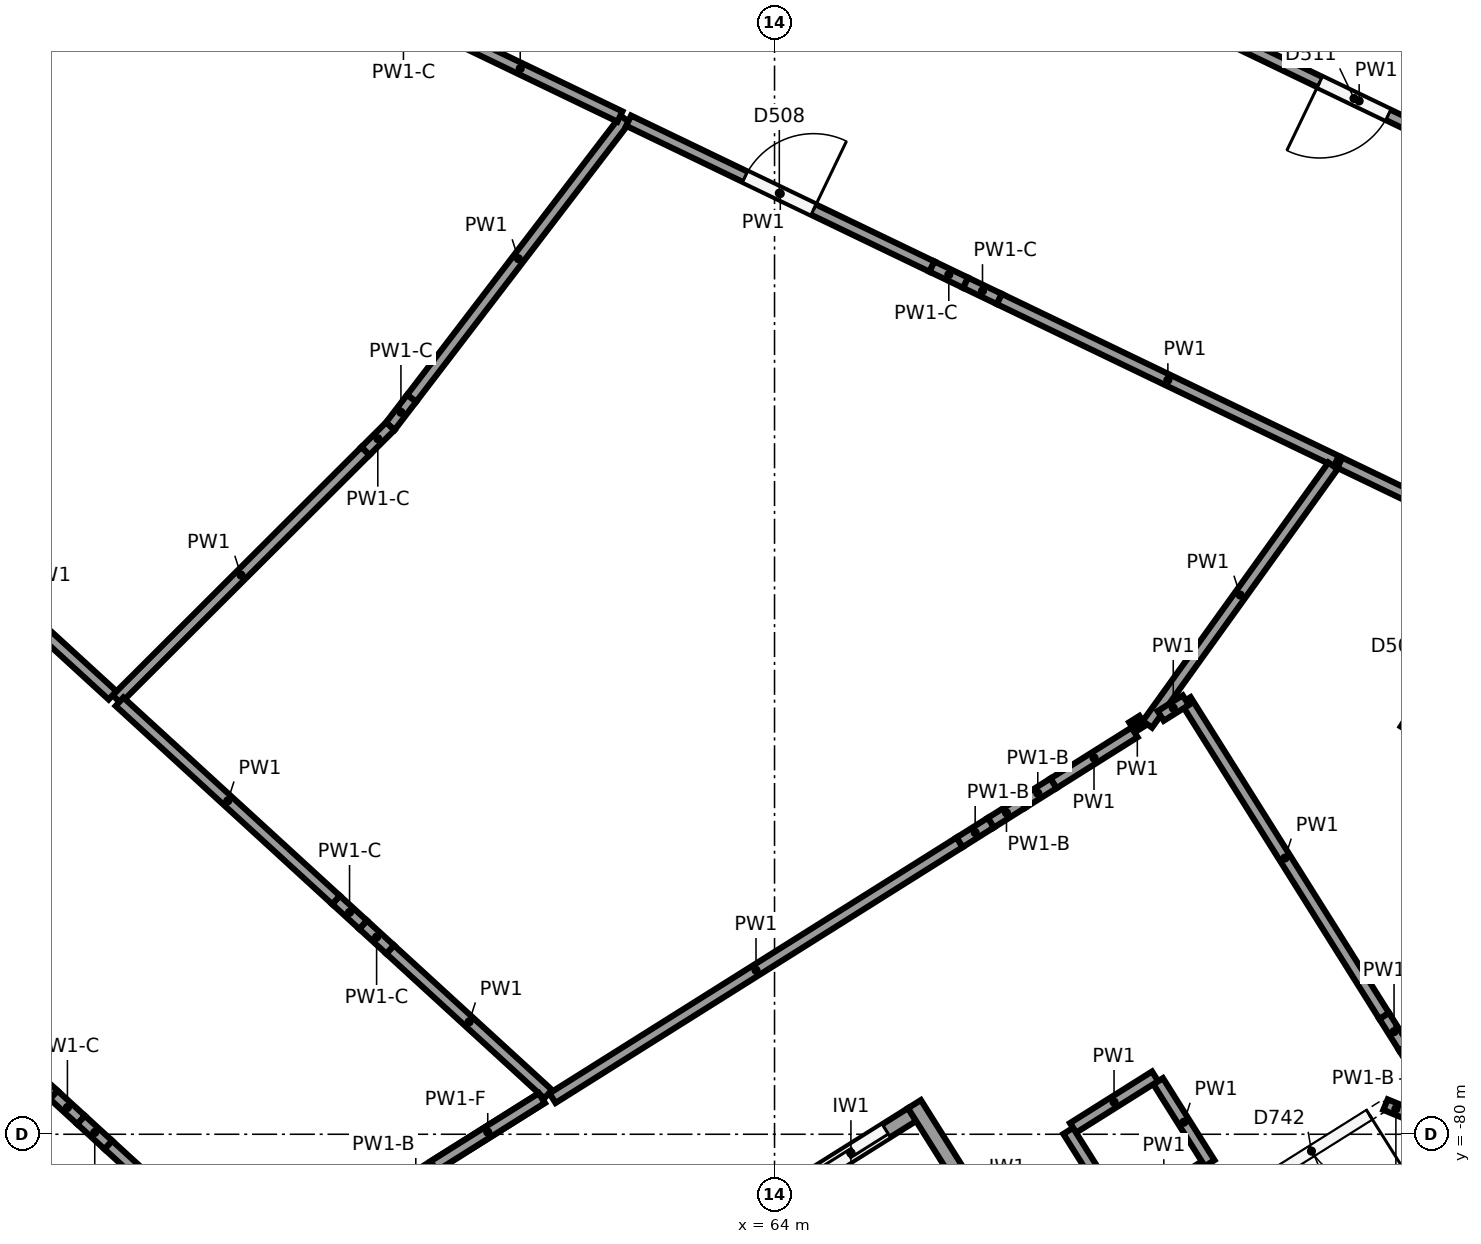
"""IFC4 building model, lengths in metres.
Left out: names, types, materials, properties, quantities, classifications, styles, units other than length and angle.
Written with IfcOpenShell. Run it as: python <this file> out.ifc"""

import sys

from ifc_helpers import new_model, si_unit, direction, frame, frame_2d, origin, origin_2d, place, context, subcontext, project, spatial, rectangle, circle, extrude, element, fill, save


model = new_model("IFC4")
c1 = context("Model", 3, precision=1e-05, world=origin(), true_north=direction((0.0, 1.0)))
c2 = subcontext(c1, "Body", "Model", "MODEL_VIEW")
j1 = project(units=[si_unit("LENGTHUNIT", "METRE"), si_unit("PLANEANGLEUNIT", "RADIAN")], contexts=[c1])
p1 = place(None, origin())
s1 = spatial("IfcSite", under=j1, at=p1, CompositionType="ELEMENT")
p2 = place(p1, origin())
s2 = spatial("IfcBuilding", under=s1, at=p2, CompositionType="ELEMENT")
p3 = place(p2, frame((0.0, 0.0, -4.0)))
s3 = spatial("IfcBuildingStorey", under=s2, at=p3, CompositionType="ELEMENT", Elevation=-4.0)
for number, where, z_axis, x_axis in (
    (1, (56.915, -78.696, -0.4), (0.0, 0.0, 1.0), (1.0, 0.0, 0.0)),
    (2, (54.82, -67.902, -0.4), (0.0, 0.0, 1.0), (1.0, 0.0, 0.0)),
):
    element("IfcColumn", number, at=place(p3, frame(where, z_axis=z_axis, x_axis=x_axis)), inside=s3, PredefinedType="COLUMN", context=c2, shape_type="SweptSolid", body=[
        extrude(circle(Radius=0.45, at=origin_2d()), origin(), (0.0, 0.0, 1.0), 4.4),
    ])
p4 = place(p3, frame((55.94, -68.658, -0.4), z_axis=(0.0, 0.0, 1.0), x_axis=(1.0, 0.0, 0.0)))
e3 = element("IfcColumn", 3, at=p4, inside=s3, PredefinedType="COLUMN", context=c2, shape_type="SweptSolid", body=[
    extrude(circle(Radius=0.4, at=origin_2d()), origin(), (0.0, 0.0, 1.0), 4.4),
])
p5 = place(p3, frame((63.068, -73.47, -0.4), z_axis=(0.0, 0.0, 1.0), x_axis=(1.0, 0.0, 0.0)))
e4 = element("IfcColumn", 4, at=p5, inside=s3, PredefinedType="COLUMN", context=c2, shape_type="SweptSolid", body=[
    extrude(circle(Radius=0.45, at=origin_2d()), origin(), (0.0, 0.0, 1.0), 4.4),
])
p6 = place(p3, frame((72.312, -79.091, -1.2), z_axis=(0.0, 0.0, 1.0), x_axis=(1.0, 0.0, 0.0)))
e5 = element("IfcColumn", 5, at=p6, inside=s3, PredefinedType="COLUMN", context=c2, shape_type="SweptSolid", body=[
    extrude(circle(Radius=0.5, at=origin_2d()), origin(), (0.0, 0.0, 1.0), 5.2),
])
p7 = place(p3, frame((67.972, -67.058, -0.4), z_axis=(0.0, 0.0, 1.0), x_axis=(1.0, 0.0, 0.0)))
e6 = element("IfcColumn", 6, at=p7, inside=s3, PredefinedType="COLUMN", context=c2, shape_type="SweptSolid", body=[
    extrude(circle(Radius=0.45, at=origin_2d()), origin(), (0.0, 0.0, 1.0), 4.4),
])
p8 = place(p3, frame((67.437, -82.143, -1.2), z_axis=(0.0, 0.0, 1.0), x_axis=(-0.532038212918, 0.84672034344, 0.0)))
e7 = element("IfcWall", 7, at=p8, inside=s3, PredefinedType="SHEAR", context=c2, shape_type="SweptSolid", body=[
    extrude(rectangle(XDim=3.0, YDim=0.2, at=frame_2d((1.5, 0.0))), origin(), (0.0, 0.0, 1.0), 4.8),
])
p9 = place(p3, frame((64.201, -80.752, -1.2), z_axis=(0.0, 0.0, 1.0), x_axis=(0.846768850524, 0.531961007765, 0.0)))
e8 = element("IfcWall", 8, at=p9, inside=s3, PredefinedType="SHEAR", context=c2, shape_type="SweptSolid", body=[
    extrude(rectangle(XDim=1.9, YDim=0.2, at=frame_2d((0.95, 0.0))), origin(), (0.0, 0.0, 1.0), 4.8),
])
p10 = place(p9, frame((0.4, 0.0, 1.2)))
e9 = element("IfcOpeningElement", 9, at=p10, cuts=e8, PredefinedType="OPENING", context=c2, shape_type="SweptSolid", body=[
    extrude(rectangle(XDim=1.1, YDim=2.1, at=frame_2d((0.55, 1.05))), frame((0.0, 0.11, 0.0), z_axis=(0.0, -1.0, 0.0), x_axis=(1.0, 0.0, 0.0)), (0.0, 0.0, 1.0), 0.22),
])
p11 = place(p3, frame((50.92, -76.19, 0.0), z_axis=(0.0, 0.0, 1.0), x_axis=(0.737613311295, -0.675223372671, 0.0)))
e10 = element("IfcWall", 10, at=p11, inside=s3, PredefinedType="PARTITIONING", context=c2, shape_type="SweptSolid", body=[
    extrude(rectangle(XDim=4.876, YDim=0.15, at=frame_2d((2.438, 0.0))), origin(), (0.0, 0.0, 1.0), 3.6),
])
for number, where, z_axis, x_axis in (
    (11, (54.517, -79.483, 0.0), (0.0, 0.0, 1.0), (0.737, -0.675, 0.0)),
    (12, (54.876, -79.812, 0.0), (0.0, 0.0, 1.0), (0.738, -0.675, 0.0)),
):
    element("IfcWall", number, at=place(p3, frame(where, z_axis=z_axis, x_axis=x_axis)), inside=s3, PredefinedType="PARTITIONING", context=c2, shape_type="SweptSolid", body=[
        extrude(rectangle(XDim=0.488, YDim=0.15, at=frame_2d((0.244, 0.0))), origin(), (0.0, 0.0, 1.0), 2.7),
    ])
p12 = place(p3, frame((55.236, -80.141, 0.0), z_axis=(0.0, 0.0, 1.0), x_axis=(0.737605282211, -0.675232143529, 0.0)))
e13 = element("IfcWall", 13, at=p12, inside=s3, PredefinedType="PARTITIONING", context=c2, shape_type="SweptSolid", body=[
    extrude(rectangle(XDim=3.413, YDim=0.15, at=frame_2d((1.707, 0.0))), origin(), (0.0, 0.0, 1.0), 3.6),
])
p13 = place(p3, frame((62.035, -66.644, 0.0), z_axis=(0.0, 0.0, 1.0), x_axis=(-0.607522587772, -0.7943024017, 0.0)))
e14 = element("IfcWall", 14, at=p13, inside=s3, PredefinedType="PARTITIONING", context=c2, shape_type="SweptSolid", body=[
    extrude(rectangle(XDim=4.626, YDim=0.15, at=frame_2d((2.313, 0.0))), origin(), (0.0, 0.0, 1.0), 3.6),
])
p14 = place(p3, frame((59.225, -70.318, 0.0), z_axis=(0.0, 0.0, 1.0), x_axis=(-0.607234679448, -0.794522525846, 0.0)))
e15 = element("IfcWall", 15, at=p14, inside=s3, PredefinedType="PARTITIONING", context=c2, shape_type="SweptSolid", body=[
    extrude(rectangle(XDim=0.463, YDim=0.15, at=frame_2d((0.231, 0.0))), origin(), (0.0, 0.0, 1.0), 2.7),
])
p15 = place(p3, frame((58.944, -70.686, 0.0), z_axis=(0.0, 0.0, 1.0), x_axis=(-0.707898761155, -0.706313913182, 0.0)))
e16 = element("IfcWall", 16, at=p15, inside=s3, PredefinedType="PARTITIONING", context=c2, shape_type="SweptSolid", body=[
    extrude(rectangle(XDim=0.462, YDim=0.15, at=frame_2d((0.231, 0.0))), origin(), (0.0, 0.0, 1.0), 2.7),
])
p16 = place(p3, frame((58.617, -71.012, 0.0), z_axis=(0.0, 0.0, 1.0), x_axis=(-0.707977942718, -0.706234545052, 0.0)))
e17 = element("IfcWall", 17, at=p16, inside=s3, PredefinedType="PARTITIONING", context=c2, shape_type="SweptSolid", body=[
    extrude(rectangle(XDim=4.621, YDim=0.15, at=frame_2d((2.311, 0.0))), origin(), (0.0, 0.0, 1.0), 3.6),
])
p17 = place(p3, frame((55.29, -74.225, 0.0), z_axis=(0.0, 0.0, 1.0), x_axis=(-0.737592778543, 0.675245801942, 0.0)))
e18 = element("IfcWall", 18, at=p17, inside=s3, PredefinedType="PARTITIONING", context=c2, shape_type="SweptSolid", body=[
    extrude(rectangle(XDim=3.395, YDim=0.15, at=frame_2d((1.698, 0.0))), origin(), (0.0, 0.0, 1.0), 3.6),
])
p18 = place(p17, frame((1.2, 0.0, 0.0)))
e19 = element("IfcOpeningElement", 19, at=p18, cuts=e18, PredefinedType="OPENING", context=c2, shape_type="SweptSolid", body=[
    extrude(rectangle(XDim=1.0, YDim=2.1, at=frame_2d((0.5, 1.05))), frame((0.0, 0.085, 0.0), z_axis=(0.0, -1.0, 0.0), x_axis=(1.0, 0.0, 0.0)), (0.0, 0.0, 1.0), 0.17),
])
p19 = place(p3, frame((59.342, -65.348, 0.0), z_axis=(0.0, 0.0, 1.0), x_axis=(0.901164254203, -0.433477781376, 0.0)))
e20 = element("IfcWall", 20, at=p19, inside=s3, PredefinedType="PARTITIONING", context=c2, shape_type="SweptSolid", body=[
    extrude(rectangle(XDim=2.912, YDim=0.15, at=frame_2d((1.456, 0.0))), origin(), (0.0, 0.0, 1.0), 3.6),
])
p20 = place(p3, frame((62.08, -66.665, 0.0), z_axis=(0.0, 0.0, 1.0), x_axis=(0.901190728749, -0.433422738694, 0.0)))
e21 = element("IfcWall", 21, at=p20, inside=s3, PredefinedType="PARTITIONING", context=c2, shape_type="SweptSolid", body=[
    extrude(rectangle(XDim=4.428, YDim=0.15, at=frame_2d((2.214, 0.0))), origin(), (0.0, 0.0, 1.0), 3.6),
])
p21 = place(p20, frame((1.7, 0.0, 0.0)))
e22 = element("IfcOpeningElement", 22, at=p21, cuts=e21, PredefinedType="OPENING", context=c2, shape_type="SweptSolid", body=[
    extrude(rectangle(XDim=1.0, YDim=2.1, at=frame_2d((0.5, 1.05))), frame((0.0, 0.085, 0.0), z_axis=(0.0, -1.0, 0.0), x_axis=(1.0, 0.0, 0.0)), (0.0, 0.0, 1.0), 0.17),
])
p22 = place(p3, frame((66.071, -68.585, 0.0), z_axis=(0.0, 0.0, 1.0), x_axis=(0.90126733215, -0.433263425643, 0.0)))
e23 = element("IfcWall", 23, at=p22, inside=s3, PredefinedType="PARTITIONING", context=c2, shape_type="SweptSolid", body=[
    extrude(rectangle(XDim=0.492, YDim=0.15, at=frame_2d((0.246, 0.0))), origin(), (0.0, 0.0, 1.0), 2.7),
])
p23 = place(p3, frame((66.514, -68.798, 0.0), z_axis=(0.0, 0.0, 1.0), x_axis=(0.901166741742, -0.433472609952, 0.0)))
e24 = element("IfcWall", 24, at=p23, inside=s3, PredefinedType="PARTITIONING", context=c2, shape_type="SweptSolid", body=[
    extrude(rectangle(XDim=0.492, YDim=0.15, at=frame_2d((0.246, 0.0))), origin(), (0.0, 0.0, 1.0), 2.7),
])
p24 = place(p3, frame((66.958, -69.011, 0.0), z_axis=(0.0, 0.0, 1.0), x_axis=(0.901198388505, -0.433406811848, 0.0)))
e25 = element("IfcWall", 25, at=p24, inside=s3, PredefinedType="PARTITIONING", context=c2, shape_type="SweptSolid", body=[
    extrude(rectangle(XDim=4.92, YDim=0.15, at=frame_2d((2.46, 0.0))), origin(), (0.0, 0.0, 1.0), 3.6),
])
p25 = place(p3, frame((71.348, -71.206, 0.0), z_axis=(0.0, 0.0, 1.0), x_axis=(-0.583304436704, -0.812253614409, 0.0)))
e26 = element("IfcWall", 26, at=p25, inside=s3, PredefinedType="PARTITIONING", context=c2, shape_type="SweptSolid", body=[
    extrude(rectangle(XDim=4.188, YDim=0.15, at=frame_2d((2.094, 0.0))), origin(), (0.0, 0.0, 1.0), 3.6),
])
p26 = place(p3, frame((68.737, -74.713, 0.0), z_axis=(0.0, 0.0, 1.0), x_axis=(-0.846733767691, -0.53201684809, 0.0)))
e27 = element("IfcWall", 27, at=p26, inside=s3, PredefinedType="PARTITIONING", context=c2, shape_type="SweptSolid", body=[
    extrude(rectangle(XDim=1.26, YDim=0.15, at=frame_2d((0.63, 0.0))), origin(), (0.0, 0.0, 1.0), 3.6),
])
for number, where, z_axis, x_axis in (
    (28, (67.67, -75.383, 0.0), (0.0, 0.0, 1.0), (-0.847, -0.532, 0.0)),
    (29, (67.258, -75.642, 0.0), (0.0, 0.0, 1.0), (-0.847, -0.532, 0.0)),
):
    element("IfcWall", number, at=place(p3, frame(where, z_axis=z_axis, x_axis=x_axis)), inside=s3, PredefinedType="PARTITIONING", context=c2, shape_type="SweptSolid", body=[
        extrude(rectangle(XDim=0.487, YDim=0.15, at=frame_2d((0.243, 0.0))), origin(), (0.0, 0.0, 1.0), 2.5),
    ])
p27 = place(p3, frame((66.846, -75.901, 0.0), z_axis=(0.0, 0.0, 1.0), x_axis=(-0.846726992897, -0.532027630392, 0.0)))
e30 = element("IfcWall", 30, at=p27, inside=s3, PredefinedType="PARTITIONING", context=c2, shape_type="SweptSolid", body=[
    extrude(rectangle(XDim=0.486, YDim=0.15, at=frame_2d((0.243, 0.0))), origin(), (0.0, 0.0, 1.0), 2.5),
])
p28 = place(p3, frame((66.434, -76.16, 0.0), z_axis=(0.0, 0.0, 1.0), x_axis=(-0.846724993081, -0.532030813105, 0.0)))
e31 = element("IfcWall", 31, at=p28, inside=s3, PredefinedType="PARTITIONING", context=c2, shape_type="SweptSolid", body=[
    extrude(rectangle(XDim=6.324, YDim=0.15, at=frame_2d((3.162, 0.0))), origin(), (0.0, 0.0, 1.0), 3.6),
])
p29 = place(p3, frame((61.021, -79.472, 0.0), z_axis=(0.0, 0.0, 1.0), x_axis=(-0.737642932996, 0.67519101253, 0.0)))
e32 = element("IfcWall", 32, at=p29, inside=s3, PredefinedType="PARTITIONING", context=c2, shape_type="SweptSolid", body=[
    extrude(rectangle(XDim=2.819, YDim=0.15, at=frame_2d((1.409, 0.0))), origin(), (0.0, 0.0, 1.0), 3.6),
])
p30 = place(p3, frame((58.942, -77.569, 0.0), z_axis=(0.0, 0.0, 1.0), x_axis=(-0.737531982112, 0.675312205844, 0.0)))
e33 = element("IfcWall", 33, at=p30, inside=s3, PredefinedType="PARTITIONING", context=c2, shape_type="SweptSolid", body=[
    extrude(rectangle(XDim=0.483, YDim=0.15, at=frame_2d((0.241, 0.0))), origin(), (0.0, 0.0, 1.0), 2.7),
])
p31 = place(p3, frame((58.586, -77.243, 0.0), z_axis=(0.0, 0.0, 1.0), x_axis=(-0.737762545062, 0.675060313679, 0.0)))
e34 = element("IfcWall", 34, at=p31, inside=s3, PredefinedType="PARTITIONING", context=c2, shape_type="SweptSolid", body=[
    extrude(rectangle(XDim=0.483, YDim=0.15, at=frame_2d((0.241, 0.0))), origin(), (0.0, 0.0, 1.0), 2.7),
])
p32 = place(p3, frame((58.23, -76.917, 0.0), z_axis=(0.0, 0.0, 1.0), x_axis=(-0.737586985775, 0.675252129516, 0.0)))
e35 = element("IfcWall", 35, at=p32, inside=s3, PredefinedType="PARTITIONING", context=c2, shape_type="SweptSolid", body=[
    extrude(rectangle(XDim=3.862, YDim=0.15, at=frame_2d((1.931, 0.0))), origin(), (0.0, 0.0, 1.0), 3.6),
])
p33 = place(p3, frame((72.803, -79.688, 0.0), z_axis=(0.0, 0.0, 1.0), x_axis=(-0.532100185812, 0.8466813995, 0.0)))
e36 = element("IfcWall", 36, at=p33, inside=s3, PredefinedType="PARTITIONING", context=c2, shape_type="SweptSolid", body=[
    extrude(rectangle(XDim=0.981, YDim=0.15, at=frame_2d((0.49, 0.0))), origin(), (0.0, 0.0, 1.0), 2.5),
])
p34 = place(p3, frame((72.281, -78.858, 0.0), z_axis=(0.0, 0.0, 1.0), x_axis=(-0.532100185812, 0.8466813995, 0.0)))
e37 = element("IfcWall", 37, at=p34, inside=s3, PredefinedType="PARTITIONING", context=c2, shape_type="SweptSolid", body=[
    extrude(rectangle(XDim=0.49, YDim=0.15, at=frame_2d((0.245, 0.0))), origin(), (0.0, 0.0, 1.0), 2.5),
])
p35 = place(p3, frame((72.021, -78.442, 0.0), z_axis=(0.0, 0.0, 1.0), x_axis=(-0.532042078101, 0.846717914733, 0.0)))
e38 = element("IfcWall", 38, at=p35, inside=s3, PredefinedType="PARTITIONING", context=c2, shape_type="SweptSolid", body=[
    extrude(rectangle(XDim=4.905, YDim=0.15, at=frame_2d((2.453, 0.0))), origin(), (0.0, 0.0, 1.0), 3.6),
])
p36 = place(p3, frame((69.411, -74.289, 0.0), z_axis=(0.0, 0.0, 1.0), x_axis=(-0.84669301854, -0.532081697069, 0.0)))
e39 = element("IfcWall", 39, at=p36, inside=s3, PredefinedType="PARTITIONING", context=c2, shape_type="SweptSolid", body=[
    extrude(rectangle(XDim=0.39, YDim=0.15, at=frame_2d((0.195, 0.0))), origin(), (0.0, 0.0, 1.0), 3.6),
])
p37 = place(p3, frame((71.437, -71.165, 0.0), z_axis=(0.0, 0.0, 1.0), x_axis=(0.901204092293, -0.433394951556, 0.0)))
e40 = element("IfcWall", 40, at=p37, inside=s3, PredefinedType="PARTITIONING", context=c2, shape_type="SweptSolid", body=[
    extrude(rectangle(XDim=2.618, YDim=0.15, at=frame_2d((1.309, 0.0))), origin(), (0.0, 0.0, 1.0), 3.6),
])
p38 = place(p3, frame((73.756, -72.364, 0.0), z_axis=(0.0, 0.0, 1.0), x_axis=(-0.532054374811, -0.846710187871, 0.0)))
e41 = element("IfcWall", 41, at=p38, inside=s3, PredefinedType="PARTITIONING", context=c2, shape_type="SweptSolid", body=[
    extrude(rectangle(XDim=2.731, YDim=0.15, at=frame_2d((1.366, 0.0))), origin(), (0.0, 0.0, 1.0), 3.6),
])
p39 = place(p38, frame((0.95, 0.0, 0.0)))
e42 = element("IfcOpeningElement", 42, at=p39, cuts=e41, PredefinedType="OPENING", context=c2, shape_type="SweptSolid", body=[
    extrude(rectangle(XDim=1.0, YDim=2.1, at=frame_2d((0.5, 1.05))), frame((0.0, 0.085, 0.0), z_axis=(0.0, -1.0, 0.0), x_axis=(1.0, 0.0, 0.0)), (0.0, 0.0, 1.0), 0.17),
])
p40 = place(p3, frame((74.058, -67.543, 0.0), z_axis=(0.0, 0.0, 1.0), x_axis=(-0.901194793343, 0.433414287319, 0.0)))
e43 = element("IfcWall", 43, at=p40, inside=s3, PredefinedType="PARTITIONING", context=c2, shape_type="SweptSolid", body=[
    extrude(rectangle(XDim=5.25, YDim=0.15, at=frame_2d((2.625, 0.0))), origin(), (0.0, 0.0, 1.0), 3.6),
])
p41 = place(p40, frame((2.2, 0.0, 0.0)))
e44 = element("IfcOpeningElement", 44, at=p41, cuts=e43, PredefinedType="OPENING", context=c2, shape_type="SweptSolid", body=[
    extrude(rectangle(XDim=1.0, YDim=2.1, at=frame_2d((0.5, 1.05))), frame((0.0, 0.085, 0.0), z_axis=(0.0, -1.0, 0.0), x_axis=(1.0, 0.0, 0.0)), (0.0, 0.0, 1.0), 0.17),
])
for number, where, z_axis, x_axis in (
    (45, (68.582, -81.099, 0.0), (0.0, 0.0, 1.0), (0.847, 0.532, 0.0)),
    (46, (69.725, -80.381, 0.0), (0.0, 0.0, 1.0), (-0.532, 0.847, 0.0)),
):
    element("IfcWall", number, at=place(p3, frame(where, z_axis=z_axis, x_axis=x_axis)), inside=s3, PredefinedType="PARTITIONING", context=c2, shape_type="SweptSolid", body=[
        extrude(rectangle(XDim=1.275, YDim=0.15, at=frame_2d((0.638, 0.0))), origin(), (0.0, 0.0, 1.0), 3.6),
    ])
for number, where, z_axis, x_axis in (
    (47, (69.007, -79.238, 0.0), (0.0, 0.0, 1.0), (-0.847, -0.532, 0.0)),
    (48, (67.864, -79.956, 0.0), (0.0, 0.0, 1.0), (0.532, -0.847, 0.0)),
):
    element("IfcWall", number, at=place(p3, frame(where, z_axis=z_axis, x_axis=x_axis)), inside=s3, PredefinedType="PARTITIONING", context=c2, shape_type="SweptSolid", body=[
        extrude(rectangle(XDim=1.275, YDim=0.15, at=frame_2d((0.637, 0.0))), origin(), (0.0, 0.0, 1.0), 3.6),
    ])
p42 = place(p3, frame((72.312, -79.723, 0.0), z_axis=(0.0, 0.0, 1.0), x_axis=(-0.923855963606, 0.38274032778, 0.0)))
e49 = element("IfcWall", 49, at=p42, inside=s3, PredefinedType="PARTITIONING", context=c2, shape_type="SweptSolid", body=[
    extrude(rectangle(XDim=0.296, YDim=0.15, at=frame_2d((0.148, 0.0))), origin(), (0.0, 0.0, 1.0), 2.5),
])
p43 = place(p3, frame((72.039, -79.61, 0.0), z_axis=(0.0, 0.0, 1.0), x_axis=(-0.846722109963, -0.532035401547, 0.0)))
e50 = element("IfcWall", 50, at=p43, inside=s3, PredefinedType="PARTITIONING", context=c2, shape_type="SweptSolid", body=[
    extrude(rectangle(XDim=10.908, YDim=0.15, at=frame_2d((5.454, 0.0))), origin(), (0.0, 0.0, 1.0), 2.5),
])
p44 = place(p43, frame((0.25, 0.0, 0.0)))
e51 = element("IfcOpeningElement", 51, at=p44, cuts=e50, PredefinedType="OPENING", context=c2, shape_type="SweptSolid", body=[
    extrude(rectangle(XDim=1.8, YDim=2.1, at=frame_2d((0.9, 1.05))), frame((0.0, 0.085, 0.0), z_axis=(0.0, -1.0, 0.0), x_axis=(1.0, 0.0, 0.0)), (0.0, 0.0, 1.0), 0.17),
])
p45 = place(p3, frame((68.841, -74.559, 0.0), z_axis=(0.0, 0.0, 1.0), x_axis=(-0.846616804934, -0.532202955275, 0.0)))
e52 = element("IfcWall", 52, at=p45, inside=s3, PredefinedType="PARTITIONING", context=c2, shape_type="SweptSolid", body=[
    extrude(rectangle(XDim=0.159, YDim=0.15, at=frame_2d((0.08, 0.0))), origin(), (0.0, 0.0, 1.0), 3.6),
])
p46 = place(p3, frame((60.937, -79.525, 0.0), z_axis=(0.0, 0.0, 1.0), x_axis=(-0.846734487447, -0.532015702558, 0.0)))
e53 = element("IfcWall", 53, at=p46, inside=s3, PredefinedType="PARTITIONING", context=c2, shape_type="SweptSolid", body=[
    extrude(rectangle(XDim=3.914, YDim=0.15, at=frame_2d((1.957, 0.0))), origin(), (0.0, 0.0, 1.0), 2.5),
])
p47 = place(p3, frame((60.937, -79.525, 2.5), z_axis=(0.0, 0.0, 1.0), x_axis=(-0.846737633906, -0.532010694749, 0.0)))
e54 = element("IfcWall", 54, at=p47, inside=s3, PredefinedType="PARTITIONING", context=c2, shape_type="SweptSolid", body=[
    extrude(rectangle(XDim=1.679, YDim=0.15, at=frame_2d((0.839, 0.0))), origin(), (0.0, 0.0, 1.0), 1.1),
])
p48 = place(p10, origin())
e55 = element("IfcDoor", 55, at=p48, inside=s3, OperationType="SLIDING_TO_RIGHT", PredefinedType="DOOR", context=c2, shape_type="SweptSolid", body=[
    extrude(rectangle(XDim=1.1, YDim=2.1, at=frame_2d((0.55, 1.05))), frame((0.0, 0.025, 0.0), z_axis=(0.0, -1.0, 0.0), x_axis=(1.0, 0.0, 0.0)), (0.0, 0.0, 1.0), 0.05),
])
fill(e9, e55)
p49 = place(p21, origin())
e56 = element("IfcDoor", 56, at=p49, inside=s3, OperationType="SINGLE_SWING_RIGHT", PredefinedType="DOOR", context=c2, shape_type="SweptSolid", body=[
    extrude(rectangle(XDim=1.0, YDim=2.1, at=frame_2d((0.5, 1.05))), frame((0.0, 0.025, 0.0), z_axis=(0.0, -1.0, 0.0), x_axis=(1.0, 0.0, 0.0)), (0.0, 0.0, 1.0), 0.05),
])
fill(e22, e56)
p50 = place(p41, origin())
e57 = element("IfcDoor", 57, at=p50, inside=s3, OperationType="SINGLE_SWING_RIGHT", PredefinedType="DOOR", context=c2, shape_type="SweptSolid", body=[
    extrude(rectangle(XDim=1.0, YDim=2.1, at=frame_2d((0.5, 1.05))), frame((0.0, 0.025, 0.0), z_axis=(0.0, -1.0, 0.0), x_axis=(1.0, 0.0, 0.0)), (0.0, 0.0, 1.0), 0.05),
])
fill(e44, e57)
p51 = place(p44, origin())
e58 = element("IfcDoor", 58, at=p51, inside=s3, OperationType="DOUBLE_DOOR_SINGLE_SWING", PredefinedType="DOOR", context=c2, shape_type="SweptSolid", body=[
    extrude(rectangle(XDim=1.8, YDim=2.1, at=frame_2d((0.9, 1.05))), frame((0.0, 0.025, 0.0), z_axis=(0.0, -1.0, 0.0), x_axis=(1.0, 0.0, 0.0)), (0.0, 0.0, 1.0), 0.05),
])
fill(e51, e58)
save(model, sys.argv[1])
